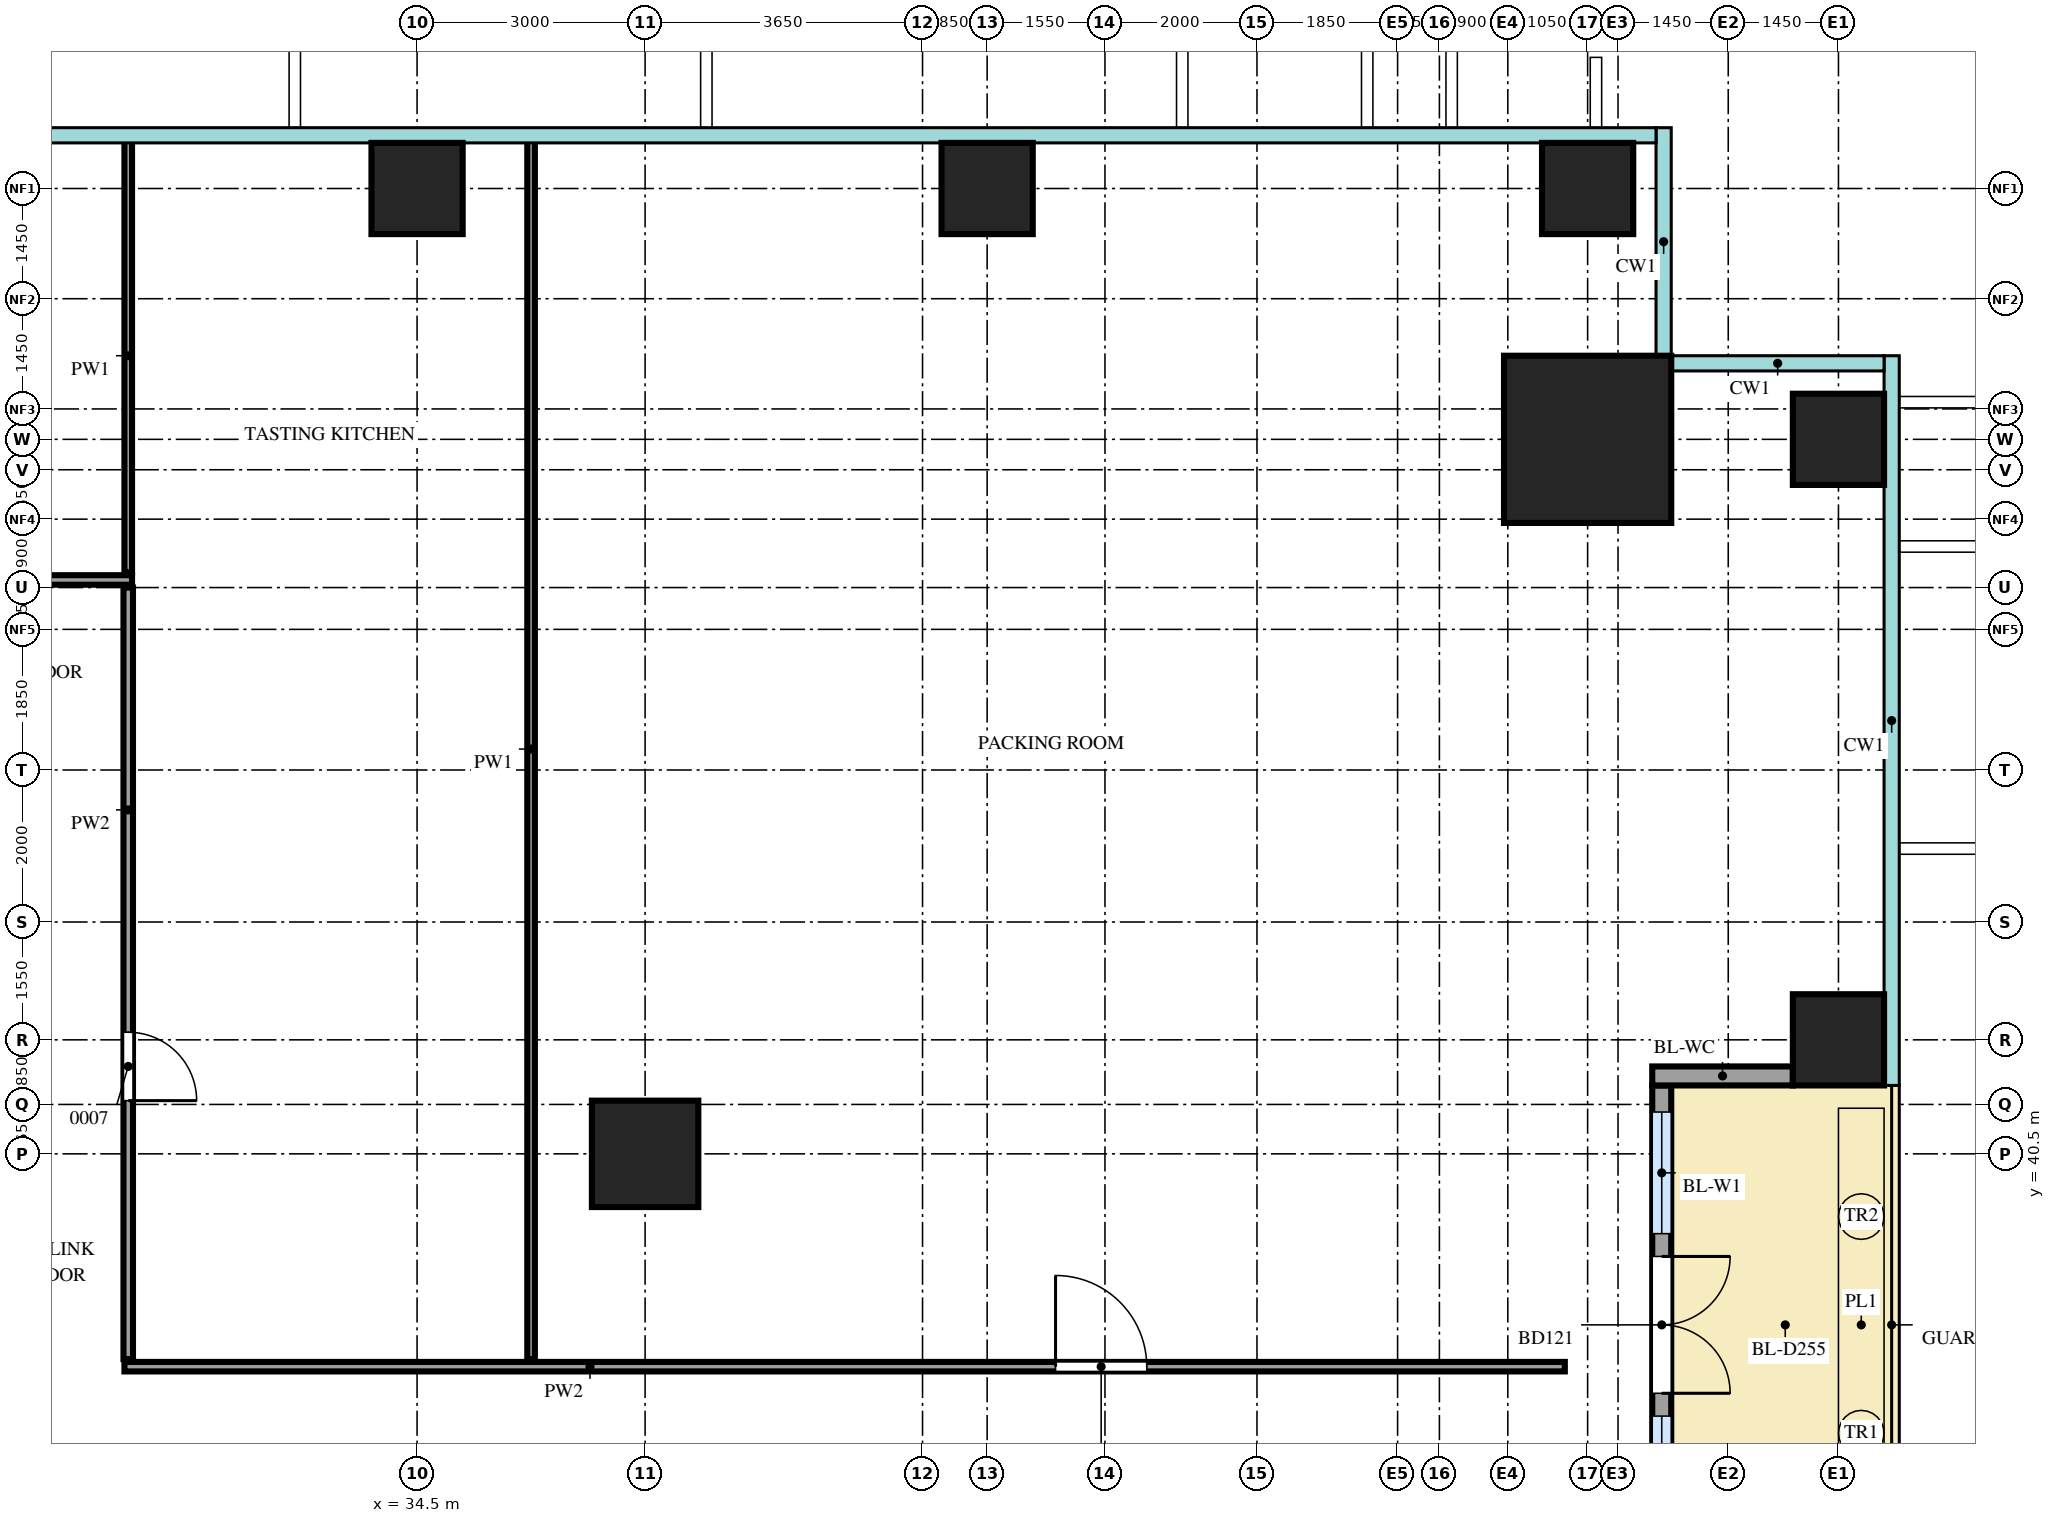
"""IFC4 building model, lengths in metres.
Left out: names, types, materials, properties, quantities, classifications, styles, units other than length and angle.
Written with IfcOpenShell. Run it as: python <this file> out.ifc"""

import sys

from ifc_helpers import new_model, si_unit, direction, frame, frame_2d, origin, origin_2d, place, context, subcontext, project, spatial, rectangle, extrude, source, transform, mapped, element, fill, save


model = new_model("IFC4")
c1 = context("Model", 3, precision=1e-05, world=origin(), true_north=direction((0.0, 1.0)))
c2 = subcontext(c1, "Body", "Model", "MODEL_VIEW")
j1 = project(units=[si_unit("LENGTHUNIT", "METRE"), si_unit("PLANEANGLEUNIT", "RADIAN")], contexts=[c1])
p1 = place(None, origin())
s1 = spatial("IfcSite", under=j1, at=p1, CompositionType="ELEMENT")
p2 = place(p1, origin())
s2 = spatial("IfcBuilding", under=s1, at=p2, CompositionType="ELEMENT")
p3 = place(p2, frame((0.0, 0.0, 60.0)))
s3 = spatial("IfcBuildingStorey", under=s2, at=p3, CompositionType="ELEMENT", Elevation=60.0)
m1 = source(origin(), c2, "Body", "SweptSolid", [
    extrude(rectangle(XDim=2.2, YDim=2.2, at=origin_2d()), origin(), (0.0, 0.0, 1.0), 4.5),
])
p4 = place(p3, frame((49.9, 49.9, 0.0), z_axis=(0.0, 0.0, 1.0), x_axis=(1.0, 0.0, 0.0)))
e1 = element("IfcColumn", 1, at=p4, inside=s3, PredefinedType="COLUMN", context=c2, shape_type="MappedRepresentation", body=[
    mapped(m1, transform((0.0, 0.0, 0.0))),
])
m2 = source(origin(), c2, "Body", "SweptSolid", [
    extrude(rectangle(XDim=1.2, YDim=1.2, at=origin_2d()), origin(), (0.0, 0.0, 1.0), 4.2),
])
for number, where, z_axis, x_axis in (
    (2, (53.2, 42.0, 0.0), (0.0, 0.0, 1.0), (1.0, 0.0, 0.0)),
    (3, (53.2, 49.9, 0.0), (0.0, 0.0, 1.0), (1.0, 0.0, 0.0)),
    (4, (34.5, 53.2, 0.0), (0.0, 0.0, 1.0), (1.0, 0.0, 0.0)),
    (5, (42.0, 53.2, 0.0), (0.0, 0.0, 1.0), (1.0, 0.0, 0.0)),
    (6, (49.9, 53.2, 0.0), (0.0, 0.0, 1.0), (1.0, 0.0, 0.0)),
):
    element("IfcColumn", number, at=place(p3, frame(where, z_axis=z_axis, x_axis=x_axis)), inside=s3, PredefinedType="COLUMN", context=c2, shape_type="MappedRepresentation", body=[
        mapped(m2, transform((0.0, 0.0, 0.0))),
    ])
m3 = source(origin(), c2, "Body", "SweptSolid", [
    extrude(rectangle(XDim=1.4, YDim=1.4, at=origin_2d()), origin(), (0.0, 0.0, 1.0), 4.2),
])
p5 = place(p3, frame((37.5, 40.5, 0.0), z_axis=(0.0, 0.0, 1.0), x_axis=(1.0, 0.0, 0.0)))
e7 = element("IfcColumn", 7, at=p5, inside=s3, PredefinedType="COLUMN", context=c2, shape_type="MappedRepresentation", body=[
    mapped(m3, transform((0.0, 0.0, 0.0))),
])
m4 = source(origin(), c2, "Body", "SweptSolid", [
    extrude(rectangle(XDim=6.3, YDim=0.25, at=frame_2d((3.15, 0.0))), origin(), (0.0, 0.0, 1.0), 3.6),
])
p6 = place(p3, frame((50.875, 35.1, 0.0), z_axis=(0.0, 0.0, 1.0), x_axis=(0.0, 1.0, 0.0)))
e8 = element("IfcWall", 8, at=p6, inside=s3, PredefinedType="SOLIDWALL", context=c2, shape_type="MappedRepresentation", body=[
    mapped(m4, transform((0.0, 0.0, 0.0))),
])
m5 = source(origin(), c2, "Body", "SweptSolid", [
    extrude(rectangle(XDim=1.6, YDim=2.4, at=frame_2d((0.8, 1.2))), frame((0.0, 0.135, 0.0), z_axis=(0.0, -1.0, 0.0), x_axis=(1.0, 0.0, 0.0)), (0.0, 0.0, 1.0), 0.27),
])
p7 = place(p6, frame((0.35, 0.0, 0.0)))
e9 = element("IfcOpeningElement", 9, at=p7, cuts=e8, PredefinedType="OPENING", context=c2, shape_type="MappedRepresentation", body=[
    mapped(m5, transform((0.0, 0.0, 0.0))),
])
p8 = place(p6, frame((4.35, 0.0, 0.0)))
e10 = element("IfcOpeningElement", 10, at=p8, cuts=e8, PredefinedType="OPENING", context=c2, shape_type="MappedRepresentation", body=[
    mapped(m5, transform((0.0, 0.0, 0.0))),
])
m6 = source(origin(), c2, "Body", "SweptSolid", [
    extrude(rectangle(XDim=1.8, YDim=2.4, at=frame_2d((0.9, 1.2))), frame((0.0, 0.135, 0.0), z_axis=(0.0, -1.0, 0.0), x_axis=(1.0, 0.0, 0.0)), (0.0, 0.0, 1.0), 0.27),
])
p9 = place(p6, frame((2.25, 0.0, 0.0)))
e11 = element("IfcOpeningElement", 11, at=p9, cuts=e8, PredefinedType="OPENING", context=c2, shape_type="MappedRepresentation", body=[
    mapped(m6, transform((0.0, 0.0, 0.0))),
])
m7 = source(origin(), c2, "Body", "SweptSolid", [
    extrude(rectangle(XDim=1.85, YDim=0.25, at=frame_2d((0.925, 0.0))), origin(), (0.0, 0.0, 1.0), 3.6),
])
p10 = place(p3, frame((52.6, 41.525, 0.0), z_axis=(0.0, 0.0, 1.0), x_axis=(-1.0, 0.0, 0.0)))
e12 = element("IfcWall", 12, at=p10, inside=s3, PredefinedType="SOLIDWALL", context=c2, shape_type="MappedRepresentation", body=[
    mapped(m7, transform((0.0, 0.0, 0.0))),
])
m8 = source(origin(), c2, "Body", "SweptSolid", [
    extrude(rectangle(XDim=18.95, YDim=0.125, at=frame_2d((9.475, 0.0))), origin(), (0.0, 0.0, 1.0), 4.3),
])
p11 = place(p3, frame((30.65, 37.7, 0.0), z_axis=(0.0, 0.0, 1.0), x_axis=(1.0, 0.0, 0.0)))
e13 = element("IfcWall", 13, at=p11, inside=s3, PredefinedType="PARTITIONING", context=c2, shape_type="MappedRepresentation", body=[
    mapped(m8, transform((0.0, 0.0, 0.0))),
])
m9 = source(origin(), c2, "Body", "SweptSolid", [
    extrude(rectangle(XDim=1.2, YDim=2.1, at=frame_2d((0.6, 1.05))), frame((0.0, 0.073, 0.0), z_axis=(0.0, -1.0, 0.0), x_axis=(1.0, 0.0, 0.0)), (0.0, 0.0, 1.0), 0.145),
])
p12 = place(p11, frame((12.25, 0.0, 0.0)))
e14 = element("IfcOpeningElement", 14, at=p12, cuts=e13, PredefinedType="OPENING", context=c2, shape_type="MappedRepresentation", body=[
    mapped(m9, transform((0.0, 0.0, 0.0))),
])
m10 = source(origin(), c2, "Body", "SweptSolid", [
    extrude(rectangle(XDim=10.15, YDim=0.125, at=frame_2d((5.075, 0.0))), origin(), (0.0, 0.0, 1.0), 4.3),
])
p13 = place(p3, frame((30.7, 37.8, 0.0), z_axis=(0.0, 0.0, 1.0), x_axis=(0.0, 1.0, 0.0)))
e15 = element("IfcWall", 15, at=p13, inside=s3, PredefinedType="PARTITIONING", context=c2, shape_type="MappedRepresentation", body=[
    mapped(m10, transform((0.0, 0.0, 0.0))),
])
m11 = source(origin(), c2, "Body", "SweptSolid", [
    extrude(rectangle(XDim=0.9, YDim=2.1, at=frame_2d((0.45, 1.05))), frame((0.0, 0.073, 0.0), z_axis=(0.0, -1.0, 0.0), x_axis=(1.0, 0.0, 0.0)), (0.0, 0.0, 1.0), 0.145),
])
p14 = place(p13, frame((3.4, 0.0, 0.0)))
e16 = element("IfcOpeningElement", 16, at=p14, cuts=e15, PredefinedType="OPENING", context=c2, shape_type="MappedRepresentation", body=[
    mapped(m11, transform((0.0, 0.0, 0.0))),
])
m12 = source(origin(), c2, "Body", "SweptSolid", [
    extrude(rectangle(XDim=16.05, YDim=0.1, at=frame_2d((8.025, 0.0))), origin(), (0.0, 0.0, 1.0), 4.3),
])
p15 = place(p3, frame((36.0, 37.8, 0.0), z_axis=(0.0, 0.0, 1.0), x_axis=(0.0, 1.0, 0.0)))
e17 = element("IfcWall", 17, at=p15, inside=s3, PredefinedType="PARTITIONING", context=c2, shape_type="MappedRepresentation", body=[
    mapped(m12, transform((0.0, 0.0, 0.0))),
])
m13 = source(origin(), c2, "Body", "SweptSolid", [
    extrude(rectangle(XDim=26.6, YDim=0.125, at=frame_2d((13.3, 0.0))), origin(), (0.0, 0.0, 1.0), 4.3),
])
p16 = place(p3, frame((4.15, 48.05, 0.0), z_axis=(0.0, 0.0, 1.0), x_axis=(1.0, 0.0, 0.0)))
e18 = element("IfcWall", 18, at=p16, inside=s3, PredefinedType="PARTITIONING", context=c2, shape_type="MappedRepresentation", body=[
    mapped(m13, transform((0.0, 0.0, 0.0))),
])
p17 = place(p16, frame((7.25, 0.0, 0.0)))
e19 = element("IfcOpeningElement", 19, at=p17, cuts=e18, PredefinedType="OPENING", context=c2, shape_type="MappedRepresentation", body=[
    mapped(m11, transform((0.0, 0.0, 0.0))),
])
p18 = place(p16, frame((20.5, 0.0, 0.0)))
e20 = element("IfcOpeningElement", 20, at=p18, cuts=e18, PredefinedType="OPENING", context=c2, shape_type="MappedRepresentation", body=[
    mapped(m11, transform((0.0, 0.0, 0.0))),
])
m14 = source(origin(), c2, "Body", "SweptSolid", [
    extrude(rectangle(XDim=5.7, YDim=0.1, at=frame_2d((2.85, 0.0))), origin(), (0.0, 0.0, 1.0), 4.3),
])
p19 = place(p3, frame((30.7, 48.15, 0.0), z_axis=(0.0, 0.0, 1.0), x_axis=(0.0, 1.0, 0.0)))
e21 = element("IfcWall", 21, at=p19, inside=s3, PredefinedType="PARTITIONING", context=c2, shape_type="MappedRepresentation", body=[
    mapped(m14, transform((0.0, 0.0, 0.0))),
])
m15 = source(origin(), c2, "Body", "SweptSolid", [
    extrude(rectangle(XDim=1.6, YDim=2.4, at=frame_2d((0.8, 1.2))), frame((0.0, 0.03, 0.0), z_axis=(0.0, -1.0, 0.0), x_axis=(1.0, 0.0, 0.0)), (0.0, 0.0, 1.0), 0.06),
])
p20 = place(p7, origin())
e22 = element("IfcWindow", 22, at=p20, inside=s3, PartitioningType="SINGLE_PANEL", PredefinedType="WINDOW", context=c2, shape_type="MappedRepresentation", body=[
    mapped(m15, transform((0.0, 0.0, 0.0))),
])
fill(e9, e22)
p21 = place(p8, origin())
e23 = element("IfcWindow", 23, at=p21, inside=s3, PartitioningType="SINGLE_PANEL", PredefinedType="WINDOW", context=c2, shape_type="MappedRepresentation", body=[
    mapped(m15, transform((0.0, 0.0, 0.0))),
])
fill(e10, e23)
m16 = source(origin(), c2, "Body", "SweptSolid", [
    extrude(rectangle(XDim=1.8, YDim=2.4, at=frame_2d((0.9, 1.2))), frame((0.0, 0.025, 0.0), z_axis=(0.0, -1.0, 0.0), x_axis=(1.0, 0.0, 0.0)), (0.0, 0.0, 1.0), 0.05),
])
p22 = place(p9, origin())
e24 = element("IfcDoor", 24, at=p22, inside=s3, OperationType="DOUBLE_DOOR_DOUBLE_SWING", PredefinedType="DOOR", context=c2, shape_type="MappedRepresentation", body=[
    mapped(m16, transform((0.0, 0.0, 0.0))),
])
fill(e11, e24)
m17 = source(origin(), c2, "Body", "SweptSolid", [
    extrude(rectangle(XDim=0.9, YDim=2.1, at=frame_2d((0.45, 1.05))), frame((0.0, 0.025, 0.0), z_axis=(0.0, -1.0, 0.0), x_axis=(1.0, 0.0, 0.0)), (0.0, 0.0, 1.0), 0.05),
])
p23 = place(p14, origin())
e25 = element("IfcDoor", 25, at=p23, inside=s3, OperationType="SINGLE_SWING_LEFT", PredefinedType="DOOR", context=c2, shape_type="MappedRepresentation", body=[
    mapped(m17, transform((0.0, 0.0, 0.0))),
])
fill(e16, e25)
m18 = source(origin(), c2, "Body", "SweptSolid", [
    extrude(rectangle(XDim=1.2, YDim=2.1, at=frame_2d((0.6, 1.05))), frame((0.0, 0.025, 0.0), z_axis=(0.0, -1.0, 0.0), x_axis=(1.0, 0.0, 0.0)), (0.0, 0.0, 1.0), 0.05),
])
p24 = place(p12, origin())
e26 = element("IfcDoor", 26, at=p24, inside=s3, OperationType="SINGLE_SWING_RIGHT", PredefinedType="DOOR", context=c2, shape_type="MappedRepresentation", body=[
    mapped(m18, transform((0.0, 0.0, 0.0))),
])
fill(e14, e26)
save(model, sys.argv[1])
